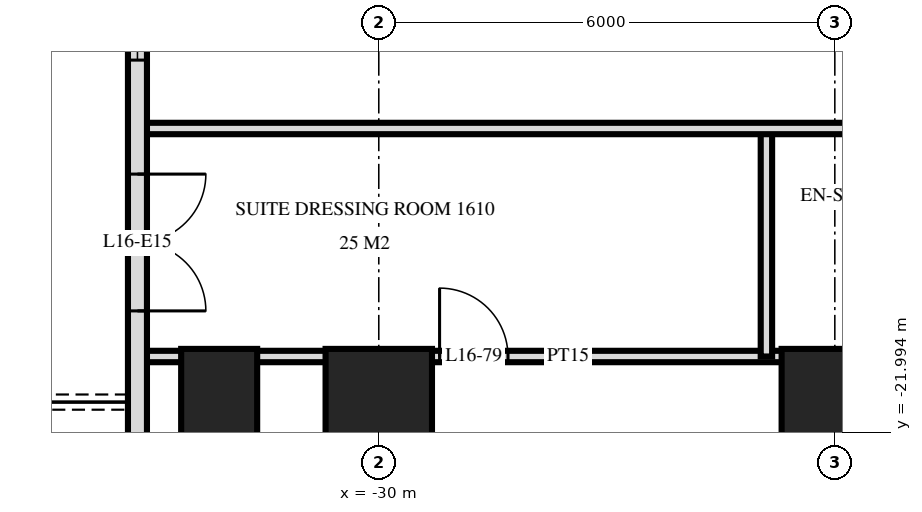
"""IFC4 building model, lengths in metres.
Left out: names, types, materials, properties, quantities, classifications, styles, units other than length and angle.
Written with IfcOpenShell. Run it as: python <this file> out.ifc"""

import sys

from ifc_helpers import new_model, si_unit, direction, frame, frame_2d, origin, origin_2d, place, context, subcontext, project, spatial, rectangle, extrude, element, fill, save


model = new_model("IFC4")
c1 = context("Model", 3, precision=1e-05, world=origin(), true_north=direction((0.0, 1.0)))
c2 = subcontext(c1, "Body", "Model", "MODEL_VIEW")
j1 = project(units=[si_unit("LENGTHUNIT", "METRE"), si_unit("PLANEANGLEUNIT", "RADIAN")], contexts=[c1])
p1 = place(None, origin())
s1 = spatial("IfcSite", under=j1, at=p1, CompositionType="ELEMENT")
p2 = place(p1, origin())
s2 = spatial("IfcBuilding", under=s1, at=p2, CompositionType="ELEMENT")
p3 = place(p2, frame((0.0, 0.0, 67.2)))
s3 = spatial("IfcBuildingStorey", under=s2, at=p3, CompositionType="ELEMENT", Elevation=67.2)
p4 = place(p3, frame((-32.1, -21.6, 0.0), z_axis=(0.0, 0.0, 1.0), x_axis=(0.0, 1.0, 0.0)))
e1 = element("IfcColumn", 1, at=p4, inside=s3, PredefinedType="COLUMN", context=c2, shape_type="SweptSolid", body=[
    extrude(rectangle(XDim=1.4, YDim=1.0, at=origin_2d()), origin(), (0.0, 0.0, 1.0), 3.6),
])
for number, where, z_axis, x_axis in (
    (2, (-30.0, -21.6, 0.0), (0.0, 0.0, 1.0), (1.0, 0.0, 0.0)),
    (3, (-24.0, -21.6, 0.0), (0.0, 0.0, 1.0), (1.0, 0.0, 0.0)),
):
    element("IfcColumn", number, at=place(p3, frame(where, z_axis=z_axis, x_axis=x_axis)), inside=s3, PredefinedType="COLUMN", context=c2, shape_type="SweptSolid", body=[
        extrude(rectangle(XDim=1.4, YDim=1.4, at=origin_2d()), origin(), (0.0, 0.0, 1.0), 3.6),
    ])
p5 = place(p3, frame((-33.175, -3.325, 0.0), z_axis=(0.0, 0.0, 1.0), x_axis=(0.0, -1.0, 0.0)))
e4 = element("IfcWall", 4, at=p5, inside=s3, PredefinedType="SOLIDWALL", context=c2, shape_type="SweptSolid", body=[
    extrude(rectangle(XDim=21.551, YDim=0.25, at=frame_2d((10.775, 0.0))), origin(), (0.0, 0.0, 1.0), 3.32),
])
p6 = place(p5, frame((6.65, 0.0, 0.0)))
e5 = element("IfcOpeningElement", 5, at=p6, cuts=e4, PredefinedType="OPENING", context=c2, shape_type="SweptSolid", body=[
    extrude(rectangle(XDim=1.8, YDim=2.4, at=frame_2d((0.9, 1.2))), frame((0.0, 0.135, 0.0), z_axis=(0.0, -1.0, 0.0), x_axis=(1.0, 0.0, 0.0)), (0.0, 0.0, 1.0), 0.27),
])
p7 = place(p5, frame((12.575, 0.0, 0.3)))
e6 = element("IfcOpeningElement", 6, at=p7, cuts=e4, PredefinedType="OPENING", context=c2, shape_type="SweptSolid", body=[
    extrude(rectangle(XDim=1.2, YDim=2.1, at=frame_2d((0.6, 1.05))), frame((0.0, 0.135, 0.0), z_axis=(0.0, -1.0, 0.0), x_axis=(1.0, 0.0, 0.0)), (0.0, 0.0, 1.0), 0.27),
])
p8 = place(p5, frame((15.275, 0.0, 0.0)))
e7 = element("IfcOpeningElement", 7, at=p8, cuts=e4, PredefinedType="OPENING", context=c2, shape_type="SweptSolid", body=[
    extrude(rectangle(XDim=1.8, YDim=2.4, at=frame_2d((0.9, 1.2))), frame((0.0, 0.135, 0.0), z_axis=(0.0, -1.0, 0.0), x_axis=(1.0, 0.0, 0.0)), (0.0, 0.0, 1.0), 0.27),
])
p9 = place(p5, frame((18.875, 0.0, 0.0)))
e8 = element("IfcOpeningElement", 8, at=p9, cuts=e4, PredefinedType="OPENING", context=c2, shape_type="SweptSolid", body=[
    extrude(rectangle(XDim=1.8, YDim=2.4, at=frame_2d((0.9, 1.2))), frame((0.0, 0.135, 0.0), z_axis=(0.0, -1.0, 0.0), x_axis=(1.0, 0.0, 0.0)), (0.0, 0.0, 1.0), 0.27),
])
p10 = place(p3, frame((-24.0, -29.22, 0.0), z_axis=(0.0, 0.0, 1.0), x_axis=(0.0, 1.0, 0.0)))
e9 = element("IfcWall", 9, at=p10, inside=s3, PredefinedType="PARTITIONING", context=c2, shape_type="SweptSolid", body=[
    extrude(rectangle(XDim=8.22, YDim=0.15, at=frame_2d((4.11, 0.0))), origin(), (0.0, 0.0, 1.0), 3.32),
])
p11 = place(p10, frame((3.59, 0.0, 0.0)))
e10 = element("IfcOpeningElement", 10, at=p11, cuts=e9, PredefinedType="OPENING", context=c2, shape_type="SweptSolid", body=[
    extrude(rectangle(XDim=0.9, YDim=2.1, at=frame_2d((0.45, 1.05))), frame((0.0, 0.085, 0.0), z_axis=(0.0, -1.0, 0.0), x_axis=(1.0, 0.0, 0.0)), (0.0, 0.0, 1.0), 0.17),
])
p12 = place(p3, frame((-24.9, -21.0, 0.0), z_axis=(0.0, 0.0, 1.0), x_axis=(0.0, 1.0, 0.0)))
e11 = element("IfcWall", 11, at=p12, inside=s3, PredefinedType="PARTITIONING", context=c2, shape_type="SweptSolid", body=[
    extrude(rectangle(XDim=3.0, YDim=0.15, at=frame_2d((1.5, 0.0))), origin(), (0.0, 0.0, 1.0), 3.32),
])
p13 = place(p3, frame((-33.12, -21.0, 0.0), z_axis=(0.0, 0.0, 1.0), x_axis=(1.0, 0.0, 0.0)))
e12 = element("IfcWall", 12, at=p13, inside=s3, PredefinedType="PARTITIONING", context=c2, shape_type="SweptSolid", body=[
    extrude(rectangle(XDim=11.22, YDim=0.15, at=frame_2d((5.61, 0.0))), origin(), (0.0, 0.0, 1.0), 3.32),
])
p14 = place(p13, frame((9.92, 0.0, 0.0)))
e13 = element("IfcOpeningElement", 13, at=p14, cuts=e12, PredefinedType="OPENING", context=c2, shape_type="SweptSolid", body=[
    extrude(rectangle(XDim=0.8, YDim=2.1, at=frame_2d((0.4, 1.05))), frame((0.0, 0.085, 0.0), z_axis=(0.0, -1.0, 0.0), x_axis=(1.0, 0.0, 0.0)), (0.0, 0.0, 1.0), 0.17),
])
p15 = place(p13, frame((3.92, 0.0, 0.0)))
e14 = element("IfcOpeningElement", 14, at=p15, cuts=e12, PredefinedType="OPENING", context=c2, shape_type="SweptSolid", body=[
    extrude(rectangle(XDim=0.9, YDim=2.1, at=frame_2d((0.45, 1.05))), frame((0.0, 0.085, 0.0), z_axis=(0.0, -1.0, 0.0), x_axis=(1.0, 0.0, 0.0)), (0.0, 0.0, 1.0), 0.17),
])
p16 = place(p3, frame((-33.12, -18.0, 0.0), z_axis=(0.0, 0.0, 1.0), x_axis=(1.0, 0.0, 0.0)))
e15 = element("IfcWall", 15, at=p16, inside=s3, PredefinedType="PARTITIONING", context=c2, shape_type="SweptSolid", body=[
    extrude(rectangle(XDim=66.24, YDim=0.15, at=frame_2d((33.12, 0.0))), origin(), (0.0, 0.0, 1.0), 3.32),
])
p17 = place(p16, frame((15.27, 0.0, 0.0)))
e16 = element("IfcOpeningElement", 16, at=p17, cuts=e15, PredefinedType="OPENING", context=c2, shape_type="SweptSolid", body=[
    extrude(rectangle(XDim=1.0, YDim=2.1, at=frame_2d((0.5, 1.05))), frame((0.0, 0.085, 0.0), z_axis=(0.0, -1.0, 0.0), x_axis=(1.0, 0.0, 0.0)), (0.0, 0.0, 1.0), 0.17),
])
p18 = place(p16, frame((21.22, 0.0, 0.0)))
e17 = element("IfcOpeningElement", 17, at=p18, cuts=e15, PredefinedType="OPENING", context=c2, shape_type="SweptSolid", body=[
    extrude(rectangle(XDim=1.0, YDim=2.1, at=frame_2d((0.5, 1.05))), frame((0.0, 0.085, 0.0), z_axis=(0.0, -1.0, 0.0), x_axis=(1.0, 0.0, 0.0)), (0.0, 0.0, 1.0), 0.17),
])
p19 = place(p16, frame((24.27, 0.0, 0.0)))
e18 = element("IfcOpeningElement", 18, at=p19, cuts=e15, PredefinedType="OPENING", context=c2, shape_type="SweptSolid", body=[
    extrude(rectangle(XDim=1.0, YDim=2.1, at=frame_2d((0.5, 1.05))), frame((0.0, 0.085, 0.0), z_axis=(0.0, -1.0, 0.0), x_axis=(1.0, 0.0, 0.0)), (0.0, 0.0, 1.0), 0.17),
])
p20 = place(p16, frame((30.97, 0.0, 0.0)))
e19 = element("IfcOpeningElement", 19, at=p20, cuts=e15, PredefinedType="OPENING", context=c2, shape_type="SweptSolid", body=[
    extrude(rectangle(XDim=1.0, YDim=2.1, at=frame_2d((0.5, 1.05))), frame((0.0, 0.085, 0.0), z_axis=(0.0, -1.0, 0.0), x_axis=(1.0, 0.0, 0.0)), (0.0, 0.0, 1.0), 0.17),
])
p21 = place(p16, frame((40.42, 0.0, 0.0)))
e20 = element("IfcOpeningElement", 20, at=p21, cuts=e15, PredefinedType="OPENING", context=c2, shape_type="SweptSolid", body=[
    extrude(rectangle(XDim=1.0, YDim=2.1, at=frame_2d((0.5, 1.05))), frame((0.0, 0.085, 0.0), z_axis=(0.0, -1.0, 0.0), x_axis=(1.0, 0.0, 0.0)), (0.0, 0.0, 1.0), 0.17),
])
p22 = place(p16, frame((43.97, 0.0, 0.0)))
e21 = element("IfcOpeningElement", 21, at=p22, cuts=e15, PredefinedType="OPENING", context=c2, shape_type="SweptSolid", body=[
    extrude(rectangle(XDim=1.0, YDim=2.1, at=frame_2d((0.5, 1.05))), frame((0.0, 0.085, 0.0), z_axis=(0.0, -1.0, 0.0), x_axis=(1.0, 0.0, 0.0)), (0.0, 0.0, 1.0), 0.17),
])
p23 = place(p16, frame((45.52, 0.0, 0.0)))
e22 = element("IfcOpeningElement", 22, at=p23, cuts=e15, PredefinedType="OPENING", context=c2, shape_type="SweptSolid", body=[
    extrude(rectangle(XDim=1.0, YDim=2.1, at=frame_2d((0.5, 1.05))), frame((0.0, 0.085, 0.0), z_axis=(0.0, -1.0, 0.0), x_axis=(1.0, 0.0, 0.0)), (0.0, 0.0, 1.0), 0.17),
])
p24 = place(p16, frame((52.97, 0.0, 0.0)))
e23 = element("IfcOpeningElement", 23, at=p24, cuts=e15, PredefinedType="OPENING", context=c2, shape_type="SweptSolid", body=[
    extrude(rectangle(XDim=1.0, YDim=2.1, at=frame_2d((0.5, 1.05))), frame((0.0, 0.085, 0.0), z_axis=(0.0, -1.0, 0.0), x_axis=(1.0, 0.0, 0.0)), (0.0, 0.0, 1.0), 0.17),
])
p25 = place(p16, frame((54.27, 0.0, 0.0)))
e24 = element("IfcOpeningElement", 24, at=p25, cuts=e15, PredefinedType="OPENING", context=c2, shape_type="SweptSolid", body=[
    extrude(rectangle(XDim=1.0, YDim=2.1, at=frame_2d((0.5, 1.05))), frame((0.0, 0.085, 0.0), z_axis=(0.0, -1.0, 0.0), x_axis=(1.0, 0.0, 0.0)), (0.0, 0.0, 1.0), 0.17),
])
p26 = place(p16, frame((13.42, 0.0, 0.0)))
e25 = element("IfcOpeningElement", 25, at=p26, cuts=e15, PredefinedType="OPENING", context=c2, shape_type="SweptSolid", body=[
    extrude(rectangle(XDim=1.0, YDim=2.1, at=frame_2d((0.5, 1.05))), frame((0.0, 0.085, 0.0), z_axis=(0.0, -1.0, 0.0), x_axis=(1.0, 0.0, 0.0)), (0.0, 0.0, 1.0), 0.17),
])
p27 = place(p16, frame((60.82, 0.0, 0.0)))
e26 = element("IfcOpeningElement", 26, at=p27, cuts=e15, PredefinedType="OPENING", context=c2, shape_type="SweptSolid", body=[
    extrude(rectangle(XDim=1.0, YDim=2.1, at=frame_2d((0.5, 1.05))), frame((0.0, 0.085, 0.0), z_axis=(0.0, -1.0, 0.0), x_axis=(1.0, 0.0, 0.0)), (0.0, 0.0, 1.0), 0.17),
])
p28 = place(p7, origin())
e27 = element("IfcWindow", 27, at=p28, inside=s3, PartitioningType="SINGLE_PANEL", PredefinedType="WINDOW", context=c2, shape_type="SweptSolid", body=[
    extrude(rectangle(XDim=1.2, YDim=2.1, at=frame_2d((0.6, 1.05))), frame((0.0, 0.03, 0.0), z_axis=(0.0, -1.0, 0.0), x_axis=(1.0, 0.0, 0.0)), (0.0, 0.0, 1.0), 0.06),
])
fill(e6, e27)
p29 = place(p8, origin())
e28 = element("IfcDoor", 28, at=p29, inside=s3, OperationType="DOUBLE_DOOR_SINGLE_SWING", PredefinedType="DOOR", context=c2, shape_type="SweptSolid", body=[
    extrude(rectangle(XDim=1.8, YDim=2.4, at=frame_2d((0.9, 1.2))), frame((0.0, 0.025, 0.0), z_axis=(0.0, -1.0, 0.0), x_axis=(1.0, 0.0, 0.0)), (0.0, 0.0, 1.0), 0.05),
])
fill(e7, e28)
p30 = place(p15, origin())
e29 = element("IfcDoor", 29, at=p30, inside=s3, OperationType="SINGLE_SWING_RIGHT", PredefinedType="DOOR", context=c2, shape_type="SweptSolid", body=[
    extrude(rectangle(XDim=0.9, YDim=2.1, at=frame_2d((0.45, 1.05))), frame((0.0, 0.025, 0.0), z_axis=(0.0, -1.0, 0.0), x_axis=(1.0, 0.0, 0.0)), (0.0, 0.0, 1.0), 0.05),
])
fill(e14, e29)
save(model, sys.argv[1])
